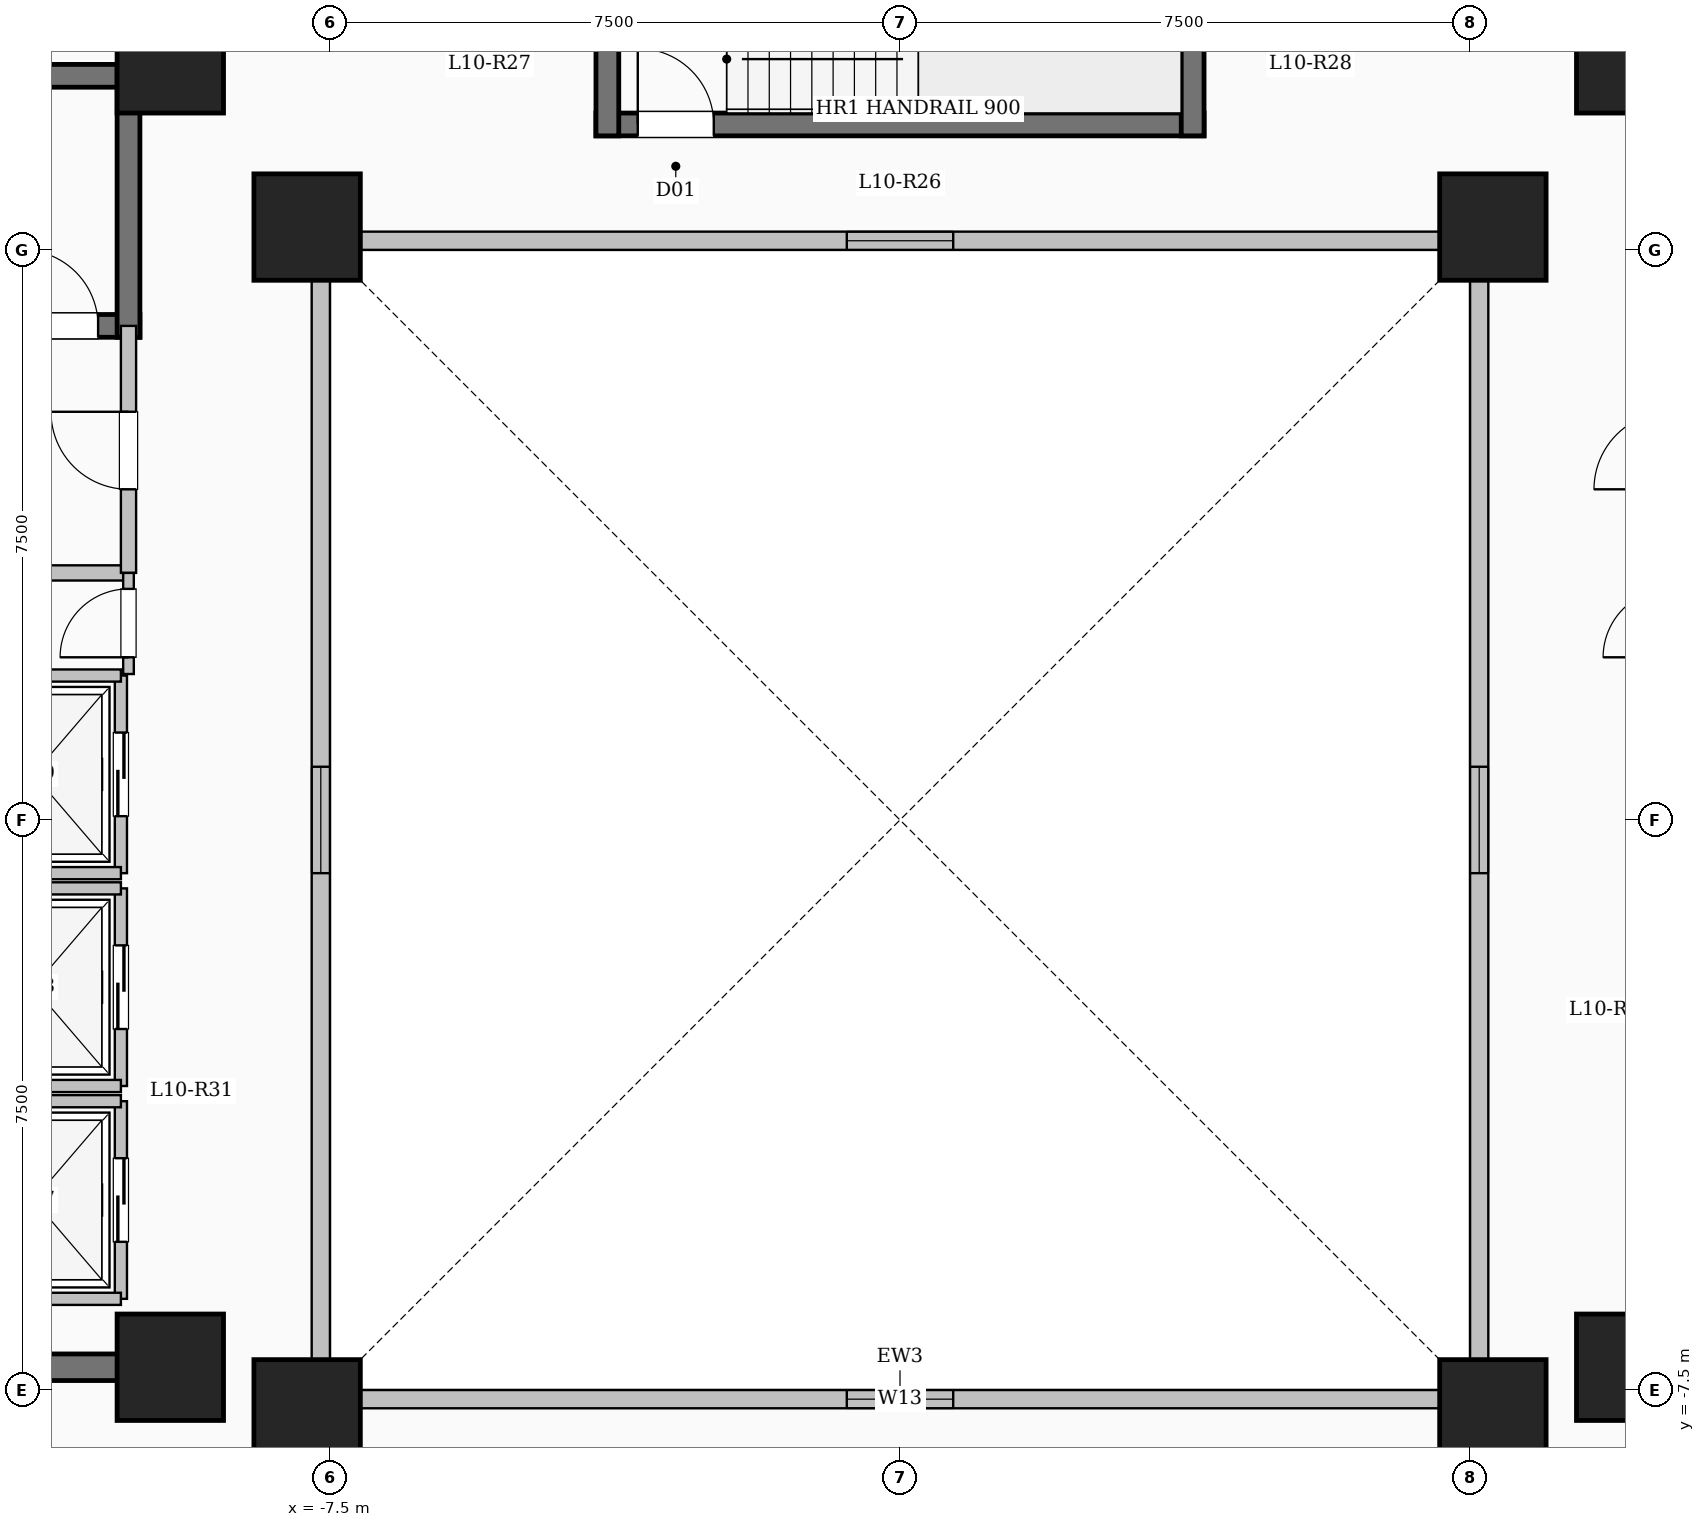
"""IFC4 building model, lengths in metres.
Left out: names, types, materials, properties, quantities, classifications, styles, units other than length and angle.
Written with IfcOpenShell. Run it as: python <this file> out.ifc"""

import sys

from ifc_helpers import new_model, si_unit, direction, frame, frame_2d, origin, origin_2d, place, context, subcontext, project, spatial, rectangle, extrude, element, fill, save


model = new_model("IFC4")
c1 = context("Model", 3, precision=1e-05, world=origin(), true_north=direction((0.0, 1.0)))
c2 = subcontext(c1, "Body", "Model", "MODEL_VIEW")
j1 = project(units=[si_unit("LENGTHUNIT", "METRE"), si_unit("PLANEANGLEUNIT", "RADIAN")], contexts=[c1])
p1 = place(None, origin())
s1 = spatial("IfcSite", under=j1, at=p1, CompositionType="ELEMENT")
p2 = place(p1, origin())
s2 = spatial("IfcBuilding", under=s1, at=p2, CompositionType="ELEMENT")
p3 = place(p2, frame((0.0, 0.0, 40.75)))
s3 = spatial("IfcBuildingStorey", under=s2, at=p3, CompositionType="ELEMENT", Elevation=40.75)
for number, where, z_axis, x_axis in (
    (1, (-7.8, -7.8, 0.0), (0.0, 0.0, 1.0), (1.0, 0.0, 0.0)),
    (2, (7.8, -7.8, 0.0), (0.0, 0.0, 1.0), (1.0, 0.0, 0.0)),
    (3, (-7.8, 7.8, 0.0), (0.0, 0.0, 1.0), (1.0, 0.0, 0.0)),
    (4, (7.8, 7.8, 0.0), (0.0, 0.0, 1.0), (1.0, 0.0, 0.0)),
    (5, (-9.6, -7.2, 0.0), (0.0, 0.0, 1.0), (1.0, 0.0, 0.0)),
    (6, (-9.6, 10.0, 0.0), (0.0, 0.0, 1.0), (1.0, 0.0, 0.0)),
    (7, (9.6, -7.2, 0.0), (0.0, 0.0, 1.0), (1.0, 0.0, 0.0)),
    (8, (9.6, 10.0, 0.0), (0.0, 0.0, 1.0), (1.0, 0.0, 0.0)),
):
    element("IfcColumn", number, at=place(p3, frame(where, z_axis=z_axis, x_axis=x_axis)), inside=s3, PredefinedType="COLUMN", context=c2, shape_type="SweptSolid", body=[
        extrude(rectangle(XDim=1.4, YDim=1.4, at=origin_2d()), origin(), (0.0, 0.0, 1.0), 3.35),
    ])
p4 = place(p3, frame((-7.62, -7.62, 0.0), z_axis=(0.0, 0.0, 1.0), x_axis=(1.0, 0.0, 0.0)))
e9 = element("IfcWall", 9, at=p4, inside=s3, PredefinedType="SOLIDWALL", context=c2, shape_type="SweptSolid", body=[
    extrude(rectangle(XDim=15.24, YDim=0.24, at=frame_2d((7.62, 0.0))), origin(), (0.0, 0.0, 1.0), 3.1),
])
p5 = place(p4, frame((6.92, 0.0, 0.95)))
e10 = element("IfcOpeningElement", 10, at=p5, cuts=e9, PredefinedType="OPENING", context=c2, shape_type="SweptSolid", body=[
    extrude(rectangle(XDim=1.4, YDim=1.5, at=frame_2d((0.7, 0.75))), frame((0.0, 0.13, 0.0), z_axis=(0.0, -1.0, 0.0), x_axis=(1.0, 0.0, 0.0)), (0.0, 0.0, 1.0), 0.26),
])
p6 = place(p3, frame((7.62, -7.62, 0.0), z_axis=(0.0, 0.0, 1.0), x_axis=(0.0, 1.0, 0.0)))
e11 = element("IfcWall", 11, at=p6, inside=s3, PredefinedType="SOLIDWALL", context=c2, shape_type="SweptSolid", body=[
    extrude(rectangle(XDim=15.24, YDim=0.24, at=frame_2d((7.62, 0.0))), origin(), (0.0, 0.0, 1.0), 3.1),
])
p7 = place(p6, frame((6.92, 0.0, 0.95)))
e12 = element("IfcOpeningElement", 12, at=p7, cuts=e11, PredefinedType="OPENING", context=c2, shape_type="SweptSolid", body=[
    extrude(rectangle(XDim=1.4, YDim=1.5, at=frame_2d((0.7, 0.75))), frame((0.0, 0.13, 0.0), z_axis=(0.0, -1.0, 0.0), x_axis=(1.0, 0.0, 0.0)), (0.0, 0.0, 1.0), 0.26),
])
p8 = place(p3, frame((7.62, 7.62, 0.0), z_axis=(0.0, 0.0, 1.0), x_axis=(-1.0, 0.0, 0.0)))
e13 = element("IfcWall", 13, at=p8, inside=s3, PredefinedType="SOLIDWALL", context=c2, shape_type="SweptSolid", body=[
    extrude(rectangle(XDim=15.24, YDim=0.24, at=frame_2d((7.62, 0.0))), origin(), (0.0, 0.0, 1.0), 3.1),
])
p9 = place(p8, frame((6.92, 0.0, 0.95)))
e14 = element("IfcOpeningElement", 14, at=p9, cuts=e13, PredefinedType="OPENING", context=c2, shape_type="SweptSolid", body=[
    extrude(rectangle(XDim=1.4, YDim=1.5, at=frame_2d((0.7, 0.75))), frame((0.0, 0.13, 0.0), z_axis=(0.0, -1.0, 0.0), x_axis=(1.0, 0.0, 0.0)), (0.0, 0.0, 1.0), 0.26),
])
p10 = place(p3, frame((-7.62, 7.62, 0.0), z_axis=(0.0, 0.0, 1.0), x_axis=(0.0, -1.0, 0.0)))
e15 = element("IfcWall", 15, at=p10, inside=s3, PredefinedType="SOLIDWALL", context=c2, shape_type="SweptSolid", body=[
    extrude(rectangle(XDim=15.24, YDim=0.24, at=frame_2d((7.62, 0.0))), origin(), (0.0, 0.0, 1.0), 3.1),
])
p11 = place(p10, frame((6.92, 0.0, 0.95)))
e16 = element("IfcOpeningElement", 16, at=p11, cuts=e15, PredefinedType="OPENING", context=c2, shape_type="SweptSolid", body=[
    extrude(rectangle(XDim=1.4, YDim=1.5, at=frame_2d((0.7, 0.75))), frame((0.0, 0.13, 0.0), z_axis=(0.0, -1.0, 0.0), x_axis=(1.0, 0.0, 0.0)), (0.0, 0.0, 1.0), 0.26),
])
p12 = place(p3, frame((-18.0, 9.79, 0.0), z_axis=(0.0, 0.0, 1.0), x_axis=(1.0, 0.0, 0.0)))
e17 = element("IfcWall", 17, at=p12, inside=s3, PredefinedType="SHEAR", context=c2, shape_type="SweptSolid", body=[
    extrude(rectangle(XDim=8.0, YDim=0.3, at=frame_2d((4.0, 0.0))), origin(), (0.0, 0.0, 1.0), 3.35),
])
p13 = place(p3, frame((-18.0, 6.5, 0.0), z_axis=(0.0, 0.0, 1.0), x_axis=(1.0, 0.0, 0.0)))
e18 = element("IfcWall", 18, at=p13, inside=s3, PredefinedType="SHEAR", context=c2, shape_type="SweptSolid", body=[
    extrude(rectangle(XDim=8.0, YDim=0.3, at=frame_2d((4.0, 0.0))), origin(), (0.0, 0.0, 1.0), 3.35),
])
p14 = place(p13, frame((6.45, 0.0, 0.0)))
e19 = element("IfcOpeningElement", 19, at=p14, cuts=e18, PredefinedType="OPENING", context=c2, shape_type="SweptSolid", body=[
    extrude(rectangle(XDim=1.0, YDim=2.15, at=frame_2d((0.5, 1.075))), frame((0.0, 0.16, 0.0), z_axis=(0.0, -1.0, 0.0), x_axis=(1.0, 0.0, 0.0)), (0.0, 0.0, 1.0), 0.32),
])
p15 = place(p3, frame((-10.15, 6.35, 0.0), z_axis=(0.0, 0.0, 1.0), x_axis=(0.0, 1.0, 0.0)))
e20 = element("IfcWall", 20, at=p15, inside=s3, PredefinedType="SHEAR", context=c2, shape_type="SweptSolid", body=[
    extrude(rectangle(XDim=3.59, YDim=0.3, at=frame_2d((1.795, 0.0))), origin(), (0.0, 0.0, 1.0), 3.35),
])
p16 = place(p3, frame((-4.0, 9.15, 0.0), z_axis=(0.0, 0.0, 1.0), x_axis=(1.0, 0.0, 0.0)))
e21 = element("IfcWall", 21, at=p16, inside=s3, PredefinedType="SHEAR", context=c2, shape_type="SweptSolid", body=[
    extrude(rectangle(XDim=8.0, YDim=0.3, at=frame_2d((4.0, 0.0))), origin(), (0.0, 0.0, 1.0), 3.35),
])
p17 = place(p16, frame((0.55, 0.0, 0.0)))
e22 = element("IfcOpeningElement", 22, at=p17, cuts=e21, PredefinedType="OPENING", context=c2, shape_type="SweptSolid", body=[
    extrude(rectangle(XDim=1.0, YDim=2.15, at=frame_2d((0.5, 1.075))), frame((0.0, 0.16, 0.0), z_axis=(0.0, -1.0, 0.0), x_axis=(1.0, 0.0, 0.0)), (0.0, 0.0, 1.0), 0.32),
])
for number, where, z_axis, x_axis in (
    (23, (-3.85, 9.0, 0.0), (0.0, 0.0, 1.0), (0.0, 1.0, 0.0)),
    (24, (3.85, 9.0, 0.0), (0.0, 0.0, 1.0), (0.0, 1.0, 0.0)),
):
    element("IfcWall", number, at=place(p3, frame(where, z_axis=z_axis, x_axis=x_axis)), inside=s3, PredefinedType="SHEAR", context=c2, shape_type="SweptSolid", body=[
        extrude(rectangle(XDim=3.59, YDim=0.3, at=frame_2d((1.795, 0.0))), origin(), (0.0, 0.0, 1.0), 3.35),
    ])
p18 = place(p3, frame((-15.55, 3.25, 0.0), z_axis=(0.0, 0.0, 1.0), x_axis=(1.0, 0.0, 0.0)))
e25 = element("IfcWall", 25, at=p18, inside=s3, PredefinedType="SOLIDWALL", context=c2, shape_type="SweptSolid", body=[
    extrude(rectangle(XDim=5.4, YDim=0.2, at=frame_2d((2.7, 0.0))), origin(), (0.0, 0.0, 1.0), 3.1),
])
p19 = place(p3, frame((-10.15, 3.25, 0.0), z_axis=(0.0, 0.0, 1.0), x_axis=(0.0, 1.0, 0.0)))
e26 = element("IfcWall", 26, at=p19, inside=s3, PredefinedType="SOLIDWALL", context=c2, shape_type="SweptSolid", body=[
    extrude(rectangle(XDim=3.25, YDim=0.2, at=frame_2d((1.625, 0.0))), origin(), (0.0, 0.0, 1.0), 3.1),
])
p20 = place(p19, frame((1.1, 0.0, 0.0)))
e27 = element("IfcOpeningElement", 27, at=p20, cuts=e26, PredefinedType="OPENING", context=c2, shape_type="SweptSolid", body=[
    extrude(rectangle(XDim=1.02, YDim=2.15, at=frame_2d((0.51, 1.075))), frame((0.0, 0.11, 0.0), z_axis=(0.0, -1.0, 0.0), x_axis=(1.0, 0.0, 0.0)), (0.0, 0.0, 1.0), 0.22),
])
p21 = place(p3, frame((-10.25, -6.3, 0.0), z_axis=(0.0, 0.0, 1.0), x_axis=(0.0, 1.0, 0.0)))
e28 = element("IfcWall", 28, at=p21, inside=s3, PredefinedType="SOLIDWALL", context=c2, shape_type="SweptSolid", body=[
    extrude(rectangle(XDim=2.6, YDim=0.16, at=frame_2d((1.3, 0.0))), origin(), (0.0, 0.0, 1.0), 3.1),
])
p22 = place(p21, frame((0.75, 0.0, 0.0)))
e29 = element("IfcOpeningElement", 29, at=p22, cuts=e28, PredefinedType="OPENING", context=c2, shape_type="SweptSolid", body=[
    extrude(rectangle(XDim=1.1, YDim=2.15, at=frame_2d((0.55, 1.075))), frame((0.0, 0.09, 0.0), z_axis=(0.0, -1.0, 0.0), x_axis=(1.0, 0.0, 0.0)), (0.0, 0.0, 1.0), 0.18),
])
for number, where, z_axis, x_axis in (
    (30, (-12.55, -6.3, 0.0), (0.0, 0.0, 1.0), (1.0, 0.0, 0.0)),
    (31, (-12.55, -3.7, 0.0), (0.0, 0.0, 1.0), (1.0, 0.0, 0.0)),
):
    element("IfcWall", number, at=place(p3, frame(where, z_axis=z_axis, x_axis=x_axis)), inside=s3, PredefinedType="SOLIDWALL", context=c2, shape_type="SweptSolid", body=[
        extrude(rectangle(XDim=2.3, YDim=0.16, at=frame_2d((1.15, 0.0))), origin(), (0.0, 0.0, 1.0), 3.1),
    ])
p23 = place(p3, frame((-10.25, -3.5, 0.0), z_axis=(0.0, 0.0, 1.0), x_axis=(0.0, 1.0, 0.0)))
e32 = element("IfcWall", 32, at=p23, inside=s3, PredefinedType="SOLIDWALL", context=c2, shape_type="SweptSolid", body=[
    extrude(rectangle(XDim=2.6, YDim=0.16, at=frame_2d((1.3, 0.0))), origin(), (0.0, 0.0, 1.0), 3.1),
])
p24 = place(p23, frame((0.75, 0.0, 0.0)))
e33 = element("IfcOpeningElement", 33, at=p24, cuts=e32, PredefinedType="OPENING", context=c2, shape_type="SweptSolid", body=[
    extrude(rectangle(XDim=1.1, YDim=2.15, at=frame_2d((0.55, 1.075))), frame((0.0, 0.09, 0.0), z_axis=(0.0, -1.0, 0.0), x_axis=(1.0, 0.0, 0.0)), (0.0, 0.0, 1.0), 0.18),
])
for number, where, z_axis, x_axis in (
    (34, (-12.55, -3.5, 0.0), (0.0, 0.0, 1.0), (1.0, 0.0, 0.0)),
    (35, (-12.55, -0.9, 0.0), (0.0, 0.0, 1.0), (1.0, 0.0, 0.0)),
):
    element("IfcWall", number, at=place(p3, frame(where, z_axis=z_axis, x_axis=x_axis)), inside=s3, PredefinedType="SOLIDWALL", context=c2, shape_type="SweptSolid", body=[
        extrude(rectangle(XDim=2.3, YDim=0.16, at=frame_2d((1.15, 0.0))), origin(), (0.0, 0.0, 1.0), 3.1),
    ])
p25 = place(p3, frame((-10.25, -0.7, 0.0), z_axis=(0.0, 0.0, 1.0), x_axis=(0.0, 1.0, 0.0)))
e36 = element("IfcWall", 36, at=p25, inside=s3, PredefinedType="SOLIDWALL", context=c2, shape_type="SweptSolid", body=[
    extrude(rectangle(XDim=2.6, YDim=0.16, at=frame_2d((1.3, 0.0))), origin(), (0.0, 0.0, 1.0), 3.1),
])
p26 = place(p25, frame((0.75, 0.0, 0.0)))
e37 = element("IfcOpeningElement", 37, at=p26, cuts=e36, PredefinedType="OPENING", context=c2, shape_type="SweptSolid", body=[
    extrude(rectangle(XDim=1.1, YDim=2.15, at=frame_2d((0.55, 1.075))), frame((0.0, 0.09, 0.0), z_axis=(0.0, -1.0, 0.0), x_axis=(1.0, 0.0, 0.0)), (0.0, 0.0, 1.0), 0.18),
])
for number, where, z_axis, x_axis in (
    (38, (-12.55, -0.7, 0.0), (0.0, 0.0, 1.0), (1.0, 0.0, 0.0)),
    (39, (-12.55, 1.9, 0.0), (0.0, 0.0, 1.0), (1.0, 0.0, 0.0)),
):
    element("IfcWall", number, at=place(p3, frame(where, z_axis=z_axis, x_axis=x_axis)), inside=s3, PredefinedType="SOLIDWALL", context=c2, shape_type="SweptSolid", body=[
        extrude(rectangle(XDim=2.3, YDim=0.16, at=frame_2d((1.15, 0.0))), origin(), (0.0, 0.0, 1.0), 3.1),
    ])
p27 = place(p3, frame((-18.625, -7.2, 0.0), z_axis=(0.0, 0.0, 1.0), x_axis=(1.0, 0.0, 0.0)))
e40 = element("IfcWall", 40, at=p27, inside=s3, PredefinedType="SHEAR", context=c2, shape_type="SweptSolid", body=[
    extrude(rectangle(XDim=8.55, YDim=0.35, at=frame_2d((4.275, 0.0))), origin(), (0.0, 0.0, 1.0), 3.35),
])
p28 = place(p3, frame((-10.15, 1.92, 0.0), z_axis=(0.0, 0.0, 1.0), x_axis=(0.0, 1.0, 0.0)))
e41 = element("IfcWall", 41, at=p28, inside=s3, PredefinedType="PARTITIONING", context=c2, shape_type="SweptSolid", body=[
    extrude(rectangle(XDim=1.33, YDim=0.14, at=frame_2d((0.665, 0.0))), origin(), (0.0, 0.0, 1.0), 3.1),
])
p29 = place(p28, frame((0.22, 0.0, 0.0)))
e42 = element("IfcOpeningElement", 42, at=p29, cuts=e41, PredefinedType="OPENING", context=c2, shape_type="SweptSolid", body=[
    extrude(rectangle(XDim=0.9, YDim=2.08, at=frame_2d((0.45, 1.04))), frame((0.0, 0.08, 0.0), z_axis=(0.0, -1.0, 0.0), x_axis=(1.0, 0.0, 0.0)), (0.0, 0.0, 1.0), 0.16),
])
p30 = place(p5, origin())
e43 = element("IfcWindow", 43, at=p30, inside=s3, PartitioningType="SINGLE_PANEL", PredefinedType="WINDOW", context=c2, shape_type="SweptSolid", body=[
    extrude(rectangle(XDim=1.4, YDim=1.5, at=frame_2d((0.7, 0.75))), frame((0.0, 0.03, 0.0), z_axis=(0.0, -1.0, 0.0), x_axis=(1.0, 0.0, 0.0)), (0.0, 0.0, 1.0), 0.06),
])
fill(e10, e43)
p31 = place(p7, origin())
e44 = element("IfcWindow", 44, at=p31, inside=s3, PartitioningType="SINGLE_PANEL", PredefinedType="WINDOW", context=c2, shape_type="SweptSolid", body=[
    extrude(rectangle(XDim=1.4, YDim=1.5, at=frame_2d((0.7, 0.75))), frame((0.0, 0.03, 0.0), z_axis=(0.0, -1.0, 0.0), x_axis=(1.0, 0.0, 0.0)), (0.0, 0.0, 1.0), 0.06),
])
fill(e12, e44)
p32 = place(p9, origin())
e45 = element("IfcWindow", 45, at=p32, inside=s3, PartitioningType="SINGLE_PANEL", PredefinedType="WINDOW", context=c2, shape_type="SweptSolid", body=[
    extrude(rectangle(XDim=1.4, YDim=1.5, at=frame_2d((0.7, 0.75))), frame((0.0, 0.03, 0.0), z_axis=(0.0, -1.0, 0.0), x_axis=(1.0, 0.0, 0.0)), (0.0, 0.0, 1.0), 0.06),
])
fill(e14, e45)
p33 = place(p11, origin())
e46 = element("IfcWindow", 46, at=p33, inside=s3, PartitioningType="SINGLE_PANEL", PredefinedType="WINDOW", context=c2, shape_type="SweptSolid", body=[
    extrude(rectangle(XDim=1.4, YDim=1.5, at=frame_2d((0.7, 0.75))), frame((0.0, 0.03, 0.0), z_axis=(0.0, -1.0, 0.0), x_axis=(1.0, 0.0, 0.0)), (0.0, 0.0, 1.0), 0.06),
])
fill(e16, e46)
p34 = place(p14, origin())
e47 = element("IfcDoor", 47, at=p34, inside=s3, OperationType="SINGLE_SWING_LEFT", PredefinedType="DOOR", context=c2, shape_type="SweptSolid", body=[
    extrude(rectangle(XDim=1.0, YDim=2.15, at=frame_2d((0.5, 1.075))), frame((0.0, 0.025, 0.0), z_axis=(0.0, -1.0, 0.0), x_axis=(1.0, 0.0, 0.0)), (0.0, 0.0, 1.0), 0.05),
])
fill(e19, e47)
p35 = place(p17, origin())
e48 = element("IfcDoor", 48, at=p35, inside=s3, OperationType="SINGLE_SWING_LEFT", PredefinedType="DOOR", context=c2, shape_type="SweptSolid", body=[
    extrude(rectangle(XDim=1.0, YDim=2.15, at=frame_2d((0.5, 1.075))), frame((0.0, 0.025, 0.0), z_axis=(0.0, -1.0, 0.0), x_axis=(1.0, 0.0, 0.0)), (0.0, 0.0, 1.0), 0.05),
])
fill(e22, e48)
p36 = place(p20, origin())
e49 = element("IfcDoor", 49, at=p36, inside=s3, OperationType="SINGLE_SWING_RIGHT", PredefinedType="DOOR", context=c2, shape_type="SweptSolid", body=[
    extrude(rectangle(XDim=1.02, YDim=2.15, at=frame_2d((0.51, 1.075))), frame((0.0, 0.025, 0.0), z_axis=(0.0, -1.0, 0.0), x_axis=(1.0, 0.0, 0.0)), (0.0, 0.0, 1.0), 0.05),
])
fill(e27, e49)
p37 = place(p22, origin())
e50 = element("IfcDoor", 50, at=p37, inside=s3, OperationType="SLIDING_TO_LEFT", PredefinedType="DOOR", context=c2, shape_type="SweptSolid", body=[
    extrude(rectangle(XDim=1.1, YDim=2.15, at=frame_2d((0.55, 1.075))), frame((0.0, 0.025, 0.0), z_axis=(0.0, -1.0, 0.0), x_axis=(1.0, 0.0, 0.0)), (0.0, 0.0, 1.0), 0.05),
])
fill(e29, e50)
p38 = place(p24, origin())
e51 = element("IfcDoor", 51, at=p38, inside=s3, OperationType="SLIDING_TO_LEFT", PredefinedType="DOOR", context=c2, shape_type="SweptSolid", body=[
    extrude(rectangle(XDim=1.1, YDim=2.15, at=frame_2d((0.55, 1.075))), frame((0.0, 0.025, 0.0), z_axis=(0.0, -1.0, 0.0), x_axis=(1.0, 0.0, 0.0)), (0.0, 0.0, 1.0), 0.05),
])
fill(e33, e51)
p39 = place(p26, origin())
e52 = element("IfcDoor", 52, at=p39, inside=s3, OperationType="SLIDING_TO_LEFT", PredefinedType="DOOR", context=c2, shape_type="SweptSolid", body=[
    extrude(rectangle(XDim=1.1, YDim=2.15, at=frame_2d((0.55, 1.075))), frame((0.0, 0.025, 0.0), z_axis=(0.0, -1.0, 0.0), x_axis=(1.0, 0.0, 0.0)), (0.0, 0.0, 1.0), 0.05),
])
fill(e37, e52)
p40 = place(p29, origin())
e53 = element("IfcDoor", 53, at=p40, inside=s3, OperationType="SINGLE_SWING_LEFT", PredefinedType="DOOR", context=c2, shape_type="SweptSolid", body=[
    extrude(rectangle(XDim=0.9, YDim=2.08, at=frame_2d((0.45, 1.04))), frame((0.0, 0.025, 0.0), z_axis=(0.0, -1.0, 0.0), x_axis=(1.0, 0.0, 0.0)), (0.0, 0.0, 1.0), 0.05),
])
fill(e42, e53)
save(model, sys.argv[1])
